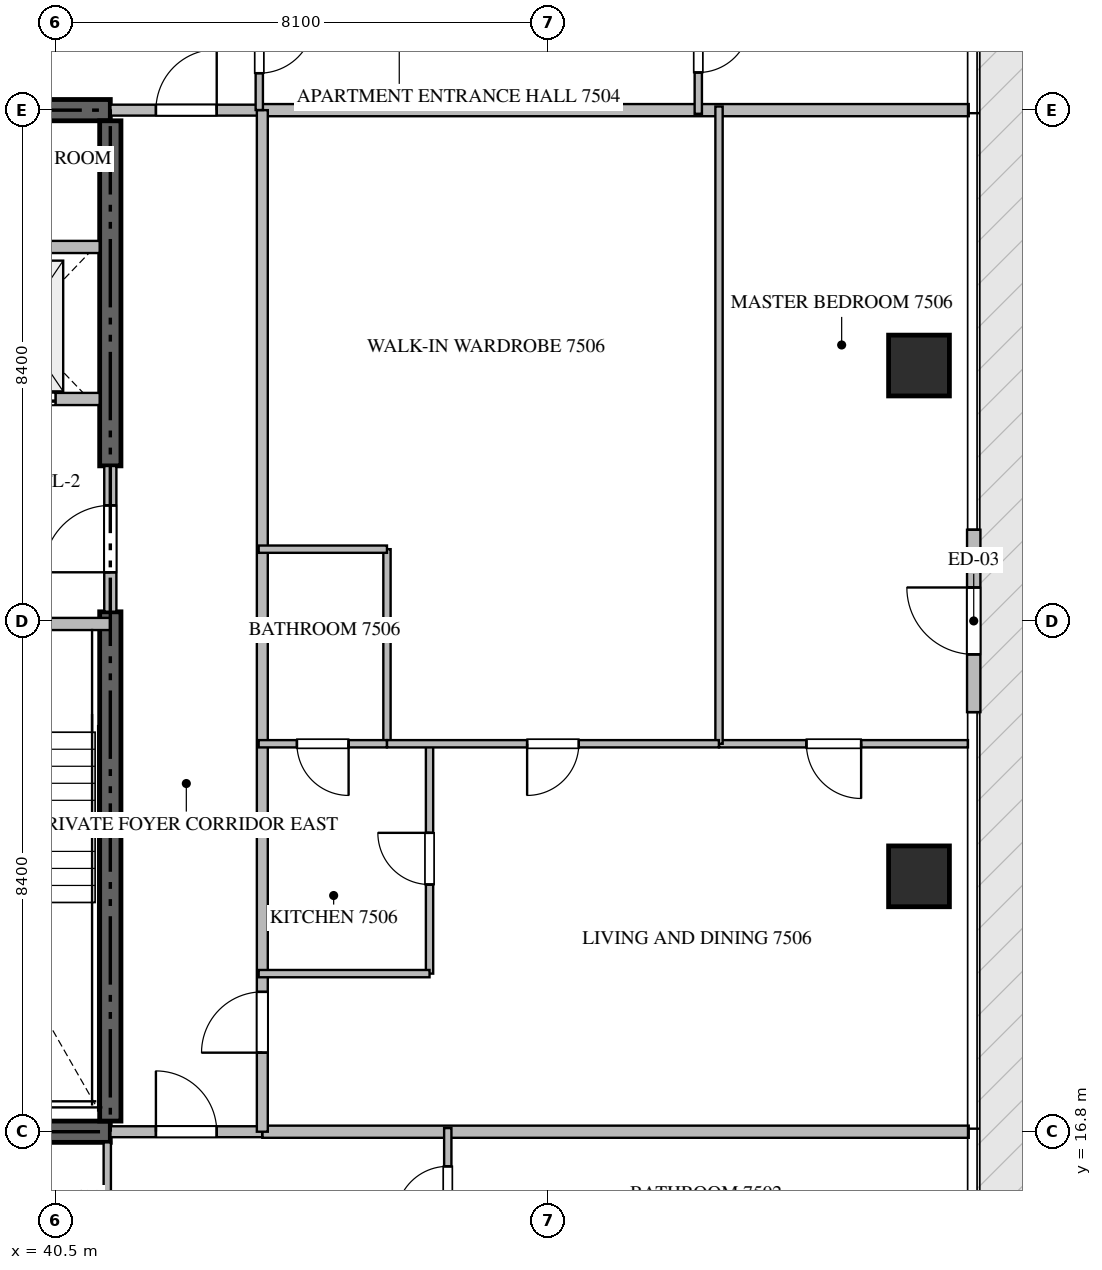
"""IFC4 building model, lengths in metres.
Left out: names, types, materials, properties, quantities, classifications, styles, units other than length and angle.
Written with IfcOpenShell. Run it as: python <this file> out.ifc"""

import sys

from ifc_helpers import new_model, si_unit, direction, frame, frame_2d, origin, origin_2d, place, context, subcontext, project, spatial, rectangle, extrude, source, transform, mapped, element, fill, save


model = new_model("IFC4")
c1 = context("Model", 3, precision=1e-05, world=origin(), true_north=direction((0.0, 1.0)))
c2 = subcontext(c1, "Body", "Model", "MODEL_VIEW")
j1 = project(units=[si_unit("LENGTHUNIT", "METRE"), si_unit("PLANEANGLEUNIT", "RADIAN")], contexts=[c1])
p1 = place(None, origin())
s1 = spatial("IfcSite", under=j1, at=p1, CompositionType="ELEMENT")
p2 = place(p1, origin())
s2 = spatial("IfcBuilding", under=s1, at=p2, CompositionType="ELEMENT")
p3 = place(p2, frame((0.0, 0.0, 301.55)))
s3 = spatial("IfcBuildingStorey", under=s2, at=p3, CompositionType="ELEMENT", Elevation=301.55)
for number, where, z_axis, x_axis in (
    (1, (23.4, 16.8, -0.26), (0.0, 0.0, 1.0), (1.0, 0.0, 0.0)),
    (2, (41.4, 33.6, -0.26), (0.0, 0.0, 1.0), (-1.0, 0.0, 0.0)),
):
    element("IfcWall", number, at=place(p3, frame(where, z_axis=z_axis, x_axis=x_axis)), inside=s3, PredefinedType="SHEAR", context=c2, shape_type="SweptSolid", body=[
        extrude(rectangle(XDim=18.0, YDim=0.35, at=frame_2d((9.0, 0.0))), origin(), (0.0, 0.0, 1.0), 4.048),
    ])
p4 = place(p3, frame((41.4, 16.975, -0.26), z_axis=(0.0, 0.0, 1.0), x_axis=(0.0, 1.0, 0.0)))
e3 = element("IfcWall", 3, at=p4, inside=s3, PredefinedType="SHEAR", context=c2, shape_type="SweptSolid", body=[
    extrude(rectangle(XDim=8.375, YDim=0.35, at=frame_2d((4.188, 0.0))), origin(), (0.0, 0.0, 1.0), 4.048),
])
p5 = place(p3, frame((41.4, 27.75, -0.26), z_axis=(0.0, 0.0, 1.0), x_axis=(0.0, 1.0, 0.0)))
e4 = element("IfcWall", 4, at=p5, inside=s3, PredefinedType="SHEAR", context=c2, shape_type="SweptSolid", body=[
    extrude(rectangle(XDim=5.675, YDim=0.35, at=frame_2d((2.837, 0.0))), origin(), (0.0, 0.0, 1.0), 4.048),
])
m1 = source(origin(), c2, "Body", "SweptSolid", [
    extrude(rectangle(XDim=1.0, YDim=1.0, at=origin_2d()), origin(), (0.0, 0.0, 1.0), 4.05),
])
for number, where, z_axis, x_axis in (
    (5, (54.7, 21.0, -0.26), (0.0, 0.0, 1.0), (1.0, 0.0, 0.0)),
    (6, (54.7, 29.4, -0.26), (0.0, 0.0, 1.0), (1.0, 0.0, 0.0)),
):
    element("IfcColumn", number, at=place(p3, frame(where, z_axis=z_axis, x_axis=x_axis)), inside=s3, PredefinedType="COLUMN", context=c2, shape_type="MappedRepresentation", body=[
        mapped(m1, transform((0.0, 0.0, 0.0), scale=1.0)),
    ])
p6 = place(p3, frame((55.6, 23.7, 0.0), z_axis=(0.0, 0.0, 1.0), x_axis=(0.0, 1.0, 0.0)))
e7 = element("IfcWall", 7, at=p6, inside=s3, PredefinedType="ELEMENTEDWALL", context=c2, shape_type="SweptSolid", body=[
    extrude(rectangle(XDim=3.0, YDim=0.22, at=frame_2d((1.5, 0.0))), origin(), (0.0, 0.0, 1.0), 3.775),
])
p7 = place(p6, frame((0.95, 0.0, 0.0)))
e8 = element("IfcOpeningElement", 8, at=p7, cuts=e7, PredefinedType="OPENING", context=c2, shape_type="SweptSolid", body=[
    extrude(rectangle(XDim=1.1, YDim=2.2, at=frame_2d((0.55, 1.1))), frame((0.0, 0.12, 0.0), z_axis=(0.0, -1.0, 0.0), x_axis=(1.0, 0.0, 0.0)), (0.0, 0.0, 1.0), 0.24),
])
p8 = place(p3, frame((36.95, 25.15, 0.0), z_axis=(0.0, 0.0, 1.0), x_axis=(1.0, 0.0, 0.0)))
e9 = element("IfcWall", 9, at=p8, inside=s3, PredefinedType="STANDARD", context=c2, shape_type="SweptSolid", body=[
    extrude(rectangle(XDim=4.45, YDim=0.2, at=frame_2d((2.225, 0.0))), origin(), (0.0, 0.0, 1.0), 3.79),
])
p9 = place(p8, frame((1.65, 0.0, 0.0)))
e10 = element("IfcOpeningElement", 10, at=p9, cuts=e9, PredefinedType="OPENING", context=c2, shape_type="SweptSolid", body=[
    extrude(rectangle(XDim=1.1, YDim=2.15, at=frame_2d((0.55, 1.075))), frame((0.0, 0.11, 0.0), z_axis=(0.0, -1.0, 0.0), x_axis=(1.0, 0.0, 0.0)), (0.0, 0.0, 1.0), 0.22),
])
p10 = place(p3, frame((38.75, 28.85, 0.0), z_axis=(0.0, 0.0, 1.0), x_axis=(1.0, 0.0, 0.0)))
e11 = element("IfcWall", 11, at=p10, inside=s3, PredefinedType="STANDARD", context=c2, shape_type="SweptSolid", body=[
    extrude(rectangle(XDim=2.475, YDim=0.2, at=frame_2d((1.238, 0.0))), origin(), (0.0, 0.0, 1.0), 3.79),
])
p11 = place(p10, frame((0.55, 0.0, 0.0)))
e12 = element("IfcOpeningElement", 12, at=p11, cuts=e11, PredefinedType="OPENING", context=c2, shape_type="SweptSolid", body=[
    extrude(rectangle(XDim=1.2, YDim=2.2, at=frame_2d((0.6, 1.1))), frame((0.0, 0.11, 0.0), z_axis=(0.0, -1.0, 0.0), x_axis=(1.0, 0.0, 0.0)), (0.0, 0.0, 1.0), 0.22),
])
p12 = place(p3, frame((38.75, 31.35, 0.0), z_axis=(0.0, 0.0, 1.0), x_axis=(1.0, 0.0, 0.0)))
e13 = element("IfcWall", 13, at=p12, inside=s3, PredefinedType="STANDARD", context=c2, shape_type="SweptSolid", body=[
    extrude(rectangle(XDim=2.475, YDim=0.2, at=frame_2d((1.238, 0.0))), origin(), (0.0, 0.0, 1.0), 3.79),
])
p13 = place(p3, frame((41.4, 25.352, 0.0), z_axis=(0.0, 0.0, 1.0), x_axis=(0.0, 1.0, 0.0)))
e14 = element("IfcWall", 14, at=p13, inside=s3, PredefinedType="STANDARD", context=c2, shape_type="SweptSolid", body=[
    extrude(rectangle(XDim=2.396, YDim=0.2, at=frame_2d((1.198, 0.0))), origin(), (0.0, 0.0, 1.0), 3.79),
])
p14 = place(p13, frame((0.648, 0.0, 0.0)))
e15 = element("IfcOpeningElement", 15, at=p14, cuts=e14, PredefinedType="OPENING", context=c2, shape_type="SweptSolid", body=[
    extrude(rectangle(XDim=1.1, YDim=2.15, at=frame_2d((0.55, 1.075))), frame((0.0, 0.11, 0.0), z_axis=(0.0, -1.0, 0.0), x_axis=(1.0, 0.0, 0.0)), (0.0, 0.0, 1.0), 0.22),
])
for number, where, z_axis, x_axis in (
    (16, (43.9, 16.8, 0.0), (0.0, 0.0, 1.0), (1.0, 0.0, 0.0)),
    (17, (43.9, 33.6, 0.0), (0.0, 0.0, 1.0), (1.0, 0.0, 0.0)),
):
    element("IfcWall", number, at=place(p3, frame(where, z_axis=z_axis, x_axis=x_axis)), inside=s3, PredefinedType="PARTITIONING", context=c2, shape_type="SweptSolid", body=[
        extrude(rectangle(XDim=11.618, YDim=0.2, at=frame_2d((5.809, 0.0))), origin(), (0.0, 0.0, 1.0), 3.79),
    ])
p15 = place(p3, frame((41.402, 16.8, 0.0), z_axis=(0.0, 0.0, 1.0), x_axis=(1.0, 0.0, 0.0)))
e18 = element("IfcWall", 18, at=p15, inside=s3, PredefinedType="PARTITIONING", context=c2, shape_type="SweptSolid", body=[
    extrude(rectangle(XDim=2.496, YDim=0.18, at=frame_2d((1.248, 0.0))), origin(), (0.0, 0.0, 1.0), 3.79),
])
p16 = place(p15, frame((0.748, 0.0, 0.0)))
e19 = element("IfcOpeningElement", 19, at=p16, cuts=e18, PredefinedType="OPENING", context=c2, shape_type="SweptSolid", body=[
    extrude(rectangle(XDim=1.0, YDim=2.15, at=frame_2d((0.5, 1.075))), frame((0.0, 0.1, 0.0), z_axis=(0.0, -1.0, 0.0), x_axis=(1.0, 0.0, 0.0)), (0.0, 0.0, 1.0), 0.2),
])
p17 = place(p3, frame((41.402, 33.6, 0.0), z_axis=(0.0, 0.0, 1.0), x_axis=(1.0, 0.0, 0.0)))
e20 = element("IfcWall", 20, at=p17, inside=s3, PredefinedType="PARTITIONING", context=c2, shape_type="SweptSolid", body=[
    extrude(rectangle(XDim=2.496, YDim=0.18, at=frame_2d((1.248, 0.0))), origin(), (0.0, 0.0, 1.0), 3.79),
])
p18 = place(p17, frame((0.748, 0.0, 0.0)))
e21 = element("IfcOpeningElement", 21, at=p18, cuts=e20, PredefinedType="OPENING", context=c2, shape_type="SweptSolid", body=[
    extrude(rectangle(XDim=1.0, YDim=2.15, at=frame_2d((0.5, 1.075))), frame((0.0, 0.1, 0.0), z_axis=(0.0, -1.0, 0.0), x_axis=(1.0, 0.0, 0.0)), (0.0, 0.0, 1.0), 0.2),
])
p19 = place(p3, frame((43.9, 16.8, 0.0), z_axis=(0.0, 0.0, 1.0), x_axis=(0.0, 1.0, 0.0)))
e22 = element("IfcWall", 22, at=p19, inside=s3, PredefinedType="PARTITIONING", context=c2, shape_type="SweptSolid", body=[
    extrude(rectangle(XDim=16.8, YDim=0.18, at=frame_2d((8.4, 0.0))), origin(), (0.0, 0.0, 1.0), 3.79),
])
p20 = place(p19, frame((1.3, 0.0, 0.0)))
e23 = element("IfcOpeningElement", 23, at=p20, cuts=e22, PredefinedType="OPENING", context=c2, shape_type="SweptSolid", body=[
    extrude(rectangle(XDim=1.0, YDim=2.15, at=frame_2d((0.5, 1.075))), frame((0.0, 0.1, 0.0), z_axis=(0.0, -1.0, 0.0), x_axis=(1.0, 0.0, 0.0)), (0.0, 0.0, 1.0), 0.2),
])
p21 = place(p3, frame((41.35, 14.05, 0.0), z_axis=(0.0, 0.0, 1.0), x_axis=(0.0, 1.0, 0.0)))
e24 = element("IfcWall", 24, at=p21, inside=s3, PredefinedType="PARTITIONING", context=c2, shape_type="SweptSolid", body=[
    extrude(rectangle(XDim=2.575, YDim=0.12, at=frame_2d((1.288, 0.0))), origin(), (0.0, 0.0, 1.0), 3.79),
])
p22 = place(p3, frame((46.95, 14.752, 0.0), z_axis=(0.0, 0.0, 1.0), x_axis=(0.0, 1.0, 0.0)))
e25 = element("IfcWall", 25, at=p22, inside=s3, PredefinedType="PARTITIONING", context=c2, shape_type="SweptSolid", body=[
    extrude(rectangle(XDim=2.108, YDim=0.12, at=frame_2d((1.054, 0.0))), origin(), (0.0, 0.0, 1.0), 3.372),
])
p23 = place(p22, frame((0.629, 0.0, 0.0)))
e26 = element("IfcOpeningElement", 26, at=p23, cuts=e25, PredefinedType="OPENING", context=c2, shape_type="SweptSolid", body=[
    extrude(rectangle(XDim=0.85, YDim=2.1, at=frame_2d((0.425, 1.05))), frame((0.0, 0.07, 0.0), z_axis=(0.0, -1.0, 0.0), x_axis=(1.0, 0.0, 0.0)), (0.0, 0.0, 1.0), 0.14),
])
p24 = place(p3, frame((43.85, 35.75, 0.0), z_axis=(0.0, 0.0, 1.0), x_axis=(0.0, -1.0, 0.0)))
e27 = element("IfcWall", 27, at=p24, inside=s3, PredefinedType="PARTITIONING", context=c2, shape_type="SweptSolid", body=[
    extrude(rectangle(XDim=2.148, YDim=0.12, at=frame_2d((1.074, 0.0))), origin(), (0.0, 0.0, 1.0), 3.79),
])
p25 = place(p24, frame((0.642, 0.0, 0.0)))
e28 = element("IfcOpeningElement", 28, at=p25, cuts=e27, PredefinedType="OPENING", context=c2, shape_type="SweptSolid", body=[
    extrude(rectangle(XDim=0.9, YDim=2.1, at=frame_2d((0.45, 1.05))), frame((0.0, 0.07, 0.0), z_axis=(0.0, -1.0, 0.0), x_axis=(1.0, 0.0, 0.0)), (0.0, 0.0, 1.0), 0.14),
])
p26 = place(p3, frame((51.07, 35.748, 0.0), z_axis=(0.0, 0.0, 1.0), x_axis=(0.0, -1.0, 0.0)))
e29 = element("IfcWall", 29, at=p26, inside=s3, PredefinedType="PARTITIONING", context=c2, shape_type="SweptSolid", body=[
    extrude(rectangle(XDim=2.208, YDim=0.12, at=frame_2d((1.104, 0.0))), origin(), (0.0, 0.0, 1.0), 3.79),
])
p27 = place(p26, frame((0.679, 0.0, 0.0)))
e30 = element("IfcOpeningElement", 30, at=p27, cuts=e29, PredefinedType="OPENING", context=c2, shape_type="SweptSolid", body=[
    extrude(rectangle(XDim=0.85, YDim=2.1, at=frame_2d((0.425, 1.05))), frame((0.0, 0.07, 0.0), z_axis=(0.0, -1.0, 0.0), x_axis=(1.0, 0.0, 0.0)), (0.0, 0.0, 1.0), 0.14),
])
p28 = place(p3, frame((46.65, 19.4, 0.0), z_axis=(0.0, 0.0, 1.0), x_axis=(0.0, 1.0, 0.0)))
e31 = element("IfcWall", 31, at=p28, inside=s3, PredefinedType="PARTITIONING", context=c2, shape_type="SweptSolid", body=[
    extrude(rectangle(XDim=3.78, YDim=0.12, at=frame_2d((1.89, 0.0))), origin(), (0.0, 0.0, 1.0), 3.79),
])
p29 = place(p28, frame((1.465, 0.0, 0.0)))
e32 = element("IfcOpeningElement", 32, at=p29, cuts=e31, PredefinedType="OPENING", context=c2, shape_type="SweptSolid", body=[
    extrude(rectangle(XDim=0.85, YDim=2.1, at=frame_2d((0.425, 1.05))), frame((0.0, 0.07, 0.0), z_axis=(0.0, -1.0, 0.0), x_axis=(1.0, 0.0, 0.0)), (0.0, 0.0, 1.0), 0.14),
])
p30 = place(p3, frame((46.65, 19.4, 0.0), z_axis=(0.0, 0.0, 1.0), x_axis=(-1.0, 0.0, 0.0)))
e33 = element("IfcWall", 33, at=p30, inside=s3, PredefinedType="PARTITIONING", context=c2, shape_type="SweptSolid", body=[
    extrude(rectangle(XDim=2.81, YDim=0.12, at=frame_2d((1.405, 0.0))), origin(), (0.0, 0.0, 1.0), 3.79),
])
p31 = place(p3, frame((55.505, 23.18, 0.0), z_axis=(0.0, 0.0, 1.0), x_axis=(-1.0, 0.0, 0.0)))
e34 = element("IfcWall", 34, at=p31, inside=s3, PredefinedType="PARTITIONING", context=c2, shape_type="SweptSolid", body=[
    extrude(rectangle(XDim=4.094, YDim=0.12, at=frame_2d((2.047, 0.0))), origin(), (0.0, 0.0, 1.0), 3.79),
])
p32 = place(p31, frame((1.757, 0.0, 0.0)))
e35 = element("IfcOpeningElement", 35, at=p32, cuts=e34, PredefinedType="OPENING", context=c2, shape_type="SweptSolid", body=[
    extrude(rectangle(XDim=0.9, YDim=2.1, at=frame_2d((0.45, 1.05))), frame((0.0, 0.07, 0.0), z_axis=(0.0, -1.0, 0.0), x_axis=(1.0, 0.0, 0.0)), (0.0, 0.0, 1.0), 0.14),
])
p33 = place(p3, frame((51.411, 23.18, 0.0), z_axis=(0.0, 0.0, 1.0), x_axis=(0.0, 1.0, 0.0)))
e36 = element("IfcWall", 36, at=p33, inside=s3, PredefinedType="PARTITIONING", context=c2, shape_type="SweptSolid", body=[
    extrude(rectangle(XDim=10.48, YDim=0.12, at=frame_2d((5.24, 0.0))), origin(), (0.0, 0.0, 1.0), 3.79),
])
p34 = place(p3, frame((45.95, 23.18, 0.0), z_axis=(0.0, 0.0, 1.0), x_axis=(0.0, 1.0, 0.0)))
e37 = element("IfcWall", 37, at=p34, inside=s3, PredefinedType="PARTITIONING", context=c2, shape_type="SweptSolid", body=[
    extrude(rectangle(XDim=3.2, YDim=0.12, at=frame_2d((1.6, 0.0))), origin(), (0.0, 0.0, 1.0), 3.79),
])
p35 = place(p3, frame((45.95, 26.38, 0.0), z_axis=(0.0, 0.0, 1.0), x_axis=(-1.0, 0.0, 0.0)))
e38 = element("IfcWall", 38, at=p35, inside=s3, PredefinedType="PARTITIONING", context=c2, shape_type="SweptSolid", body=[
    extrude(rectangle(XDim=2.11, YDim=0.12, at=frame_2d((1.055, 0.0))), origin(), (0.0, 0.0, 1.0), 3.79),
])
p36 = place(p3, frame((51.409, 23.18, 0.0), z_axis=(0.0, 0.0, 1.0), x_axis=(-1.0, 0.0, 0.0)))
e39 = element("IfcWall", 39, at=p36, inside=s3, PredefinedType="PARTITIONING", context=c2, shape_type="SweptSolid", body=[
    extrude(rectangle(XDim=5.459, YDim=0.12, at=frame_2d((2.729, 0.0))), origin(), (0.0, 0.0, 1.0), 3.79),
])
p37 = place(p36, frame((2.304, 0.0, 0.0)))
e40 = element("IfcOpeningElement", 40, at=p37, cuts=e39, PredefinedType="OPENING", context=c2, shape_type="SweptSolid", body=[
    extrude(rectangle(XDim=0.85, YDim=2.1, at=frame_2d((0.425, 1.05))), frame((0.0, 0.07, 0.0), z_axis=(0.0, -1.0, 0.0), x_axis=(1.0, 0.0, 0.0)), (0.0, 0.0, 1.0), 0.14),
])
p38 = place(p3, frame((45.948, 23.18, 0.0), z_axis=(0.0, 0.0, 1.0), x_axis=(-1.0, 0.0, 0.0)))
e41 = element("IfcWall", 41, at=p38, inside=s3, PredefinedType="PARTITIONING", context=c2, shape_type="SweptSolid", body=[
    extrude(rectangle(XDim=2.108, YDim=0.12, at=frame_2d((1.054, 0.0))), origin(), (0.0, 0.0, 1.0), 3.79),
])
p39 = place(p38, frame((0.629, 0.0, 0.0)))
e42 = element("IfcOpeningElement", 42, at=p39, cuts=e41, PredefinedType="OPENING", context=c2, shape_type="SweptSolid", body=[
    extrude(rectangle(XDim=0.85, YDim=2.1, at=frame_2d((0.425, 1.05))), frame((0.0, 0.07, 0.0), z_axis=(0.0, -1.0, 0.0), x_axis=(1.0, 0.0, 0.0)), (0.0, 0.0, 1.0), 0.14),
])
m2 = source(origin(), c2, "Body", "SweptSolid", [
    extrude(rectangle(XDim=1.1, YDim=2.2, at=frame_2d((0.55, 1.1))), frame((0.0, 0.025, 0.0), z_axis=(0.0, -1.0, 0.0), x_axis=(1.0, 0.0, 0.0)), (0.0, 0.0, 1.0), 0.05),
])
p40 = place(p7, origin())
e43 = element("IfcDoor", 43, at=p40, inside=s3, OperationType="SINGLE_SWING_RIGHT", PredefinedType="DOOR", context=c2, shape_type="MappedRepresentation", body=[
    mapped(m2, transform((0.0, 0.0, 0.0), scale=1.0)),
])
fill(e8, e43)
m3 = source(origin(), c2, "Body", "SweptSolid", [
    extrude(rectangle(XDim=1.2, YDim=2.2, at=frame_2d((0.6, 1.1))), frame((0.0, 0.025, 0.0), z_axis=(0.0, -1.0, 0.0), x_axis=(1.0, 0.0, 0.0)), (0.0, 0.0, 1.0), 0.05),
])
p41 = place(p11, origin())
e44 = element("IfcDoor", 44, at=p41, inside=s3, OperationType="DOUBLE_DOOR_SLIDING", PredefinedType="DOOR", context=c2, shape_type="MappedRepresentation", body=[
    mapped(m3, transform((0.0, 0.0, 0.0), scale=1.0)),
])
fill(e12, e44)
m4 = source(origin(), c2, "Body", "SweptSolid", [
    extrude(rectangle(XDim=1.1, YDim=2.15, at=frame_2d((0.55, 1.075))), frame((0.0, 0.025, 0.0), z_axis=(0.0, -1.0, 0.0), x_axis=(1.0, 0.0, 0.0)), (0.0, 0.0, 1.0), 0.05),
])
p42 = place(p14, origin())
e45 = element("IfcDoor", 45, at=p42, inside=s3, OperationType="SINGLE_SWING_LEFT", PredefinedType="DOOR", context=c2, shape_type="MappedRepresentation", body=[
    mapped(m4, transform((0.0, 0.0, 0.0), scale=1.0)),
])
fill(e15, e45)
m5 = source(origin(), c2, "Body", "SweptSolid", [
    extrude(rectangle(XDim=1.0, YDim=2.15, at=frame_2d((0.5, 1.075))), frame((0.0, 0.025, 0.0), z_axis=(0.0, -1.0, 0.0), x_axis=(1.0, 0.0, 0.0)), (0.0, 0.0, 1.0), 0.05),
])
p43 = place(p16, origin())
e46 = element("IfcDoor", 46, at=p43, inside=s3, OperationType="SINGLE_SWING_LEFT", PredefinedType="DOOR", context=c2, shape_type="MappedRepresentation", body=[
    mapped(m5, transform((0.0, 0.0, 0.0), scale=1.0)),
])
fill(e19, e46)
p44 = place(p18, origin())
e47 = element("IfcDoor", 47, at=p44, inside=s3, OperationType="SINGLE_SWING_RIGHT", PredefinedType="DOOR", context=c2, shape_type="MappedRepresentation", body=[
    mapped(m5, transform((0.0, 0.0, 0.0), scale=1.0)),
])
fill(e21, e47)
p45 = place(p20, origin())
e48 = element("IfcDoor", 48, at=p45, inside=s3, OperationType="SINGLE_SWING_LEFT", PredefinedType="DOOR", context=c2, shape_type="MappedRepresentation", body=[
    mapped(m5, transform((0.0, 0.0, 0.0), scale=1.0)),
])
fill(e23, e48)
m6 = source(origin(), c2, "Body", "SweptSolid", [
    extrude(rectangle(XDim=0.85, YDim=2.1, at=frame_2d((0.425, 1.05))), frame((0.0, 0.025, 0.0), z_axis=(0.0, -1.0, 0.0), x_axis=(1.0, 0.0, 0.0)), (0.0, 0.0, 1.0), 0.05),
])
p46 = place(p23, origin())
e49 = element("IfcDoor", 49, at=p46, inside=s3, OperationType="SINGLE_SWING_LEFT", PredefinedType="DOOR", context=c2, shape_type="MappedRepresentation", body=[
    mapped(m6, transform((0.0, 0.0, 0.0), scale=1.0)),
])
fill(e26, e49)
m7 = source(origin(), c2, "Body", "SweptSolid", [
    extrude(rectangle(XDim=0.9, YDim=2.1, at=frame_2d((0.45, 1.05))), frame((0.0, 0.025, 0.0), z_axis=(0.0, -1.0, 0.0), x_axis=(1.0, 0.0, 0.0)), (0.0, 0.0, 1.0), 0.05),
])
p47 = place(p25, origin())
e50 = element("IfcDoor", 50, at=p47, inside=s3, OperationType="SINGLE_SWING_LEFT", PredefinedType="DOOR", context=c2, shape_type="MappedRepresentation", body=[
    mapped(m7, transform((0.0, 0.0, 0.0), scale=1.0)),
])
fill(e28, e50)
p48 = place(p27, origin())
e51 = element("IfcDoor", 51, at=p48, inside=s3, OperationType="SINGLE_SWING_LEFT", PredefinedType="DOOR", context=c2, shape_type="MappedRepresentation", body=[
    mapped(m6, transform((0.0, 0.0, 0.0), scale=1.0)),
])
fill(e30, e51)
p49 = place(p29, origin())
e52 = element("IfcDoor", 52, at=p49, inside=s3, OperationType="SINGLE_SWING_RIGHT", PredefinedType="DOOR", context=c2, shape_type="MappedRepresentation", body=[
    mapped(m6, transform((0.0, 0.0, 0.0), scale=1.0)),
])
fill(e32, e52)
p50 = place(p32, origin())
e53 = element("IfcDoor", 53, at=p50, inside=s3, OperationType="SINGLE_SWING_LEFT", PredefinedType="DOOR", context=c2, shape_type="MappedRepresentation", body=[
    mapped(m7, transform((0.0, 0.0, 0.0), scale=1.0)),
])
fill(e35, e53)
p51 = place(p37, origin())
e54 = element("IfcDoor", 54, at=p51, inside=s3, OperationType="SINGLE_SWING_RIGHT", PredefinedType="DOOR", context=c2, shape_type="MappedRepresentation", body=[
    mapped(m6, transform((0.0, 0.0, 0.0), scale=1.0)),
])
fill(e40, e54)
p52 = place(p39, origin())
e55 = element("IfcDoor", 55, at=p52, inside=s3, OperationType="SINGLE_SWING_LEFT", PredefinedType="DOOR", context=c2, shape_type="MappedRepresentation", body=[
    mapped(m6, transform((0.0, 0.0, 0.0), scale=1.0)),
])
fill(e42, e55)
save(model, sys.argv[1])
